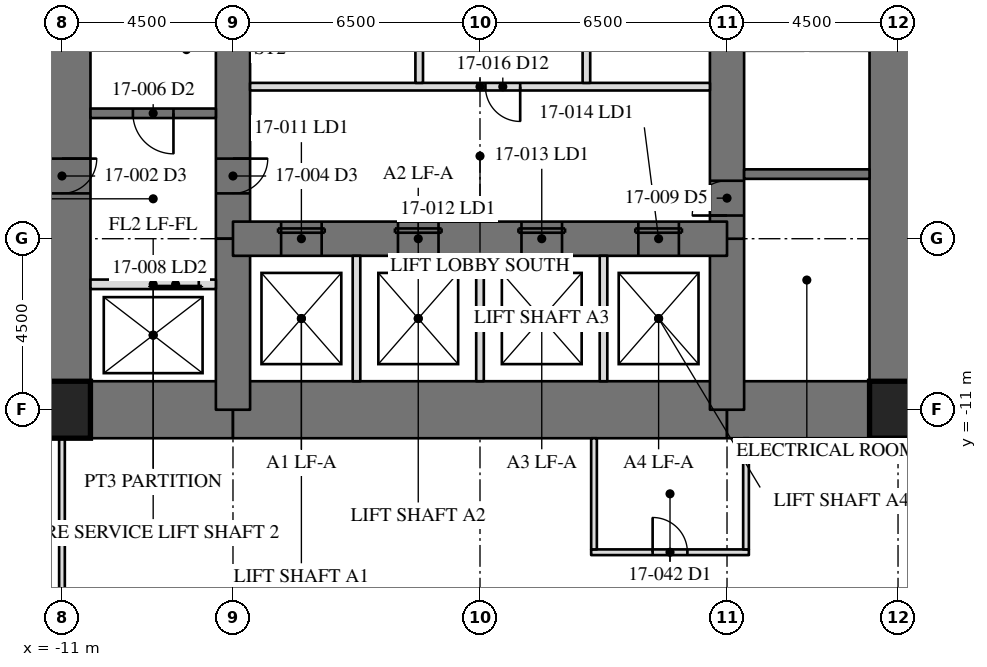
"""IFC4 building model, lengths in metres.
Left out: names, types, materials, properties, quantities, classifications, styles, units other than length and angle.
Written with IfcOpenShell. Run it as: python <this file> out.ifc"""

import sys

from ifc_helpers import new_model, si_unit, direction, frame, frame_2d, origin, origin_2d, place, context, subcontext, project, spatial, rectangle, hollow_rectangle, extrude, element, fill, save


model = new_model("IFC4")
c1 = context("Model", 3, precision=1e-05, world=origin(), true_north=direction((0.0, 1.0)))
c2 = subcontext(c1, "Body", "Model", "MODEL_VIEW")
j1 = project(units=[si_unit("LENGTHUNIT", "METRE"), si_unit("PLANEANGLEUNIT", "RADIAN")], contexts=[c1])
p1 = place(None, origin())
s1 = spatial("IfcSite", under=j1, at=p1, CompositionType="ELEMENT")
p2 = place(p1, origin())
s2 = spatial("IfcBuilding", under=s1, at=p2, CompositionType="ELEMENT")
p3 = place(p2, frame((0.0, 0.0, 73.4)))
s3 = spatial("IfcBuildingStorey", under=s2, at=p3, CompositionType="ELEMENT", Elevation=73.4)
p4 = place(p3, frame((11.0, -11.0, 0.0), z_axis=(0.0, 0.0, 1.0), x_axis=(0.0, 1.0, 0.0)))
e1 = element("IfcWall", 1, at=p4, inside=s3, PredefinedType="SHEAR", context=c2, shape_type="SweptSolid", body=[
    extrude(rectangle(XDim=22.0, YDim=1.5, at=frame_2d((11.0, 0.0))), origin(), (0.0, 0.0, 1.0), 4.1),
])
p5 = place(p4, frame((15.393, 0.0, 0.0)))
e2 = element("IfcOpeningElement", 2, at=p5, cuts=e1, PredefinedType="OPENING", context=c2, shape_type="SweptSolid", body=[
    extrude(rectangle(XDim=0.915, YDim=2.134, at=frame_2d((0.458, 1.067))), frame((0.0, 0.76, 0.0), z_axis=(0.0, -1.0, 0.0), x_axis=(1.0, 0.0, 0.0)), (0.0, 0.0, 1.0), 1.52),
])
p6 = place(p3, frame((-11.0, 11.0, 0.0), z_axis=(0.0, 0.0, 1.0), x_axis=(0.0, -1.0, 0.0)))
e3 = element("IfcWall", 3, at=p6, inside=s3, PredefinedType="SHEAR", context=c2, shape_type="SweptSolid", body=[
    extrude(rectangle(XDim=22.0, YDim=1.5, at=frame_2d((11.0, 0.0))), origin(), (0.0, 0.0, 1.0), 4.1),
])
p7 = place(p6, frame((15.393, 0.0, 0.0)))
e4 = element("IfcOpeningElement", 4, at=p7, cuts=e3, PredefinedType="OPENING", context=c2, shape_type="SweptSolid", body=[
    extrude(rectangle(XDim=0.915, YDim=2.134, at=frame_2d((0.458, 1.067))), frame((0.0, 0.76, 0.0), z_axis=(0.0, -1.0, 0.0), x_axis=(1.0, 0.0, 0.0)), (0.0, 0.0, 1.0), 1.52),
])
p8 = place(p3, frame((-11.0, -11.0, 0.0), z_axis=(0.0, 0.0, 1.0), x_axis=(1.0, 0.0, 0.0)))
e5 = element("IfcWall", 5, at=p8, inside=s3, PredefinedType="SHEAR", context=c2, shape_type="SweptSolid", body=[
    extrude(rectangle(XDim=4.5, YDim=1.5, at=frame_2d((2.25, 0.0))), origin(), (0.0, 0.0, 1.0), 4.1),
])
p9 = place(p3, frame((-6.5, -11.0, 0.0), z_axis=(0.0, 0.0, 1.0), x_axis=(1.0, 0.0, 0.0)))
e6 = element("IfcWall", 6, at=p9, inside=s3, PredefinedType="SHEAR", context=c2, shape_type="SweptSolid", body=[
    extrude(rectangle(XDim=13.0, YDim=1.5, at=frame_2d((6.5, 0.0))), origin(), (0.0, 0.0, 1.0), 4.1),
])
p10 = place(p3, frame((6.5, -11.0, 0.0), z_axis=(0.0, 0.0, 1.0), x_axis=(1.0, 0.0, 0.0)))
e7 = element("IfcWall", 7, at=p10, inside=s3, PredefinedType="SHEAR", context=c2, shape_type="SweptSolid", body=[
    extrude(rectangle(XDim=4.5, YDim=1.5, at=frame_2d((2.25, 0.0))), origin(), (0.0, 0.0, 1.0), 4.1),
])
p11 = place(p3, frame((6.5, -11.0, 0.0), z_axis=(0.0, 0.0, 1.0), x_axis=(0.0, 1.0, 0.0)))
e8 = element("IfcWall", 8, at=p11, inside=s3, PredefinedType="SHEAR", context=c2, shape_type="SweptSolid", body=[
    extrude(rectangle(XDim=4.5, YDim=0.9, at=frame_2d((2.25, 0.0))), origin(), (0.0, 0.0, 1.0), 4.1),
])
p12 = place(p3, frame((6.5, -6.5, 0.0), z_axis=(0.0, 0.0, 1.0), x_axis=(0.0, 1.0, 0.0)))
e9 = element("IfcWall", 9, at=p12, inside=s3, PredefinedType="SHEAR", context=c2, shape_type="SweptSolid", body=[
    extrude(rectangle(XDim=13.0, YDim=0.9, at=frame_2d((6.5, 0.0))), origin(), (0.0, 0.0, 1.0), 4.1),
])
p13 = place(p12, frame((10.893, 0.0, 0.0)))
e10 = element("IfcOpeningElement", 10, at=p13, cuts=e9, PredefinedType="OPENING", context=c2, shape_type="SweptSolid", body=[
    extrude(rectangle(XDim=0.915, YDim=2.134, at=frame_2d((0.458, 1.067))), frame((0.0, 0.46, 0.0), z_axis=(0.0, -1.0, 0.0), x_axis=(1.0, 0.0, 0.0)), (0.0, 0.0, 1.0), 0.92),
])
p14 = place(p12, frame((0.61, 0.0, 0.0)))
e11 = element("IfcOpeningElement", 11, at=p14, cuts=e9, PredefinedType="OPENING", context=c2, shape_type="SweptSolid", body=[
    extrude(rectangle(XDim=0.915, YDim=2.134, at=frame_2d((0.458, 1.067))), frame((0.0, 0.46, 0.0), z_axis=(0.0, -1.0, 0.0), x_axis=(1.0, 0.0, 0.0)), (0.0, 0.0, 1.0), 0.92),
])
p15 = place(p3, frame((-6.5, 6.5, 0.0), z_axis=(0.0, 0.0, 1.0), x_axis=(0.0, -1.0, 0.0)))
e12 = element("IfcWall", 12, at=p15, inside=s3, PredefinedType="SHEAR", context=c2, shape_type="SweptSolid", body=[
    extrude(rectangle(XDim=13.0, YDim=0.9, at=frame_2d((6.5, 0.0))), origin(), (0.0, 0.0, 1.0), 4.1),
])
p16 = place(p15, frame((10.893, 0.0, 0.0)))
e13 = element("IfcOpeningElement", 13, at=p16, cuts=e12, PredefinedType="OPENING", context=c2, shape_type="SweptSolid", body=[
    extrude(rectangle(XDim=0.915, YDim=2.134, at=frame_2d((0.458, 1.067))), frame((0.0, 0.46, 0.0), z_axis=(0.0, -1.0, 0.0), x_axis=(1.0, 0.0, 0.0)), (0.0, 0.0, 1.0), 0.92),
])
p17 = place(p15, frame((0.61, 0.0, 0.0)))
e14 = element("IfcOpeningElement", 14, at=p17, cuts=e12, PredefinedType="OPENING", context=c2, shape_type="SweptSolid", body=[
    extrude(rectangle(XDim=0.915, YDim=2.134, at=frame_2d((0.458, 1.067))), frame((0.0, 0.46, 0.0), z_axis=(0.0, -1.0, 0.0), x_axis=(1.0, 0.0, 0.0)), (0.0, 0.0, 1.0), 0.92),
])
p18 = place(p3, frame((-6.5, -6.5, 0.0), z_axis=(0.0, 0.0, 1.0), x_axis=(0.0, -1.0, 0.0)))
e15 = element("IfcWall", 15, at=p18, inside=s3, PredefinedType="SHEAR", context=c2, shape_type="SweptSolid", body=[
    extrude(rectangle(XDim=4.5, YDim=0.9, at=frame_2d((2.25, 0.0))), origin(), (0.0, 0.0, 1.0), 4.1),
])
p19 = place(p3, frame((-6.5, -6.5, 0.0), z_axis=(0.0, 0.0, 1.0), x_axis=(1.0, 0.0, 0.0)))
e16 = element("IfcWall", 16, at=p19, inside=s3, PredefinedType="SHEAR", context=c2, shape_type="SweptSolid", body=[
    extrude(rectangle(XDim=13.0, YDim=0.9, at=frame_2d((6.5, 0.0))), origin(), (0.0, 0.0, 1.0), 4.1),
])
p20 = place(p19, frame((1.267, 0.0, 0.0)))
e17 = element("IfcOpeningElement", 17, at=p20, cuts=e16, PredefinedType="OPENING", context=c2, shape_type="SweptSolid", body=[
    extrude(rectangle(XDim=1.067, YDim=2.134, at=frame_2d((0.533, 1.067))), frame((0.0, 0.46, 0.0), z_axis=(0.0, -1.0, 0.0), x_axis=(1.0, 0.0, 0.0)), (0.0, 0.0, 1.0), 0.92),
])
p21 = place(p19, frame((4.342, 0.0, 0.0)))
e18 = element("IfcOpeningElement", 18, at=p21, cuts=e16, PredefinedType="OPENING", context=c2, shape_type="SweptSolid", body=[
    extrude(rectangle(XDim=1.067, YDim=2.134, at=frame_2d((0.533, 1.067))), frame((0.0, 0.46, 0.0), z_axis=(0.0, -1.0, 0.0), x_axis=(1.0, 0.0, 0.0)), (0.0, 0.0, 1.0), 0.92),
])
p22 = place(p19, frame((7.592, 0.0, 0.0)))
e19 = element("IfcOpeningElement", 19, at=p22, cuts=e16, PredefinedType="OPENING", context=c2, shape_type="SweptSolid", body=[
    extrude(rectangle(XDim=1.067, YDim=2.134, at=frame_2d((0.533, 1.067))), frame((0.0, 0.46, 0.0), z_axis=(0.0, -1.0, 0.0), x_axis=(1.0, 0.0, 0.0)), (0.0, 0.0, 1.0), 0.92),
])
p23 = place(p19, frame((10.667, 0.0, 0.0)))
e20 = element("IfcOpeningElement", 20, at=p23, cuts=e16, PredefinedType="OPENING", context=c2, shape_type="SweptSolid", body=[
    extrude(rectangle(XDim=1.067, YDim=2.134, at=frame_2d((0.533, 1.067))), frame((0.0, 0.46, 0.0), z_axis=(0.0, -1.0, 0.0), x_axis=(1.0, 0.0, 0.0)), (0.0, 0.0, 1.0), 0.92),
])
for number, where, z_axis, x_axis in (
    (21, (-11.0, -11.0, 0.0), (0.0, 0.0, 1.0), (1.0, 0.0, 0.0)),
    (22, (11.0, -11.0, 0.0), (0.0, 0.0, 1.0), (1.0, 0.0, 0.0)),
):
    element("IfcColumn", number, at=place(p3, frame(where, z_axis=z_axis, x_axis=x_axis)), inside=s3, PredefinedType="COLUMN", context=c2, shape_type="SweptSolid", body=[
        extrude(hollow_rectangle(XDim=1.499, YDim=1.499, WallThickness=0.102, at=origin_2d()), origin(), (0.0, 0.0, 1.0), 4.1),
    ])
p24 = place(p3, frame((6.95, -4.8, 0.0), z_axis=(0.0, 0.0, 1.0), x_axis=(1.0, 0.0, 0.0)))
e23 = element("IfcWall", 23, at=p24, inside=s3, PredefinedType="SOLIDWALL", context=c2, shape_type="SweptSolid", body=[
    extrude(rectangle(XDim=3.3, YDim=0.25, at=frame_2d((1.65, 0.0))), origin(), (0.0, 0.0, 1.0), 3.91),
])
p25 = place(p3, frame((-6.95, -3.2, 0.0), z_axis=(0.0, 0.0, 1.0), x_axis=(-1.0, 0.0, 0.0)))
e24 = element("IfcWall", 24, at=p25, inside=s3, PredefinedType="SOLIDWALL", context=c2, shape_type="SweptSolid", body=[
    extrude(rectangle(XDim=3.3, YDim=0.25, at=frame_2d((1.65, 0.0))), origin(), (0.0, 0.0, 1.0), 3.91),
])
p26 = place(p25, frame((1.116, 0.0, 0.0)))
e25 = element("IfcOpeningElement", 25, at=p26, cuts=e24, PredefinedType="OPENING", context=c2, shape_type="SweptSolid", body=[
    extrude(rectangle(XDim=1.067, YDim=2.134, at=frame_2d((0.533, 1.067))), frame((0.0, 0.135, 0.0), z_axis=(0.0, -1.0, 0.0), x_axis=(1.0, 0.0, 0.0)), (0.0, 0.0, 1.0), 0.27),
])
p27 = place(p3, frame((-6.95, -7.7, 0.0), z_axis=(0.0, 0.0, 1.0), x_axis=(-1.0, 0.0, 0.0)))
e26 = element("IfcWall", 26, at=p27, inside=s3, PredefinedType="PARTITIONING", context=c2, shape_type="SweptSolid", body=[
    extrude(rectangle(XDim=3.3, YDim=0.25, at=frame_2d((1.65, 0.0))), origin(), (0.0, 0.0, 1.0), 3.91),
])
p28 = place(p27, frame((0.45, 0.0, 0.0)))
e27 = element("IfcOpeningElement", 27, at=p28, cuts=e26, PredefinedType="OPENING", context=c2, shape_type="SweptSolid", body=[
    extrude(rectangle(XDim=1.219, YDim=2.134, at=frame_2d((0.609, 1.067))), frame((0.0, 0.135, 0.0), z_axis=(0.0, -1.0, 0.0), x_axis=(1.0, 0.0, 0.0)), (0.0, 0.0, 1.0), 0.27),
])
p29 = place(p3, frame((6.05, -2.5, 0.0), z_axis=(0.0, 0.0, 1.0), x_axis=(-1.0, 0.0, 0.0)))
e28 = element("IfcWall", 28, at=p29, inside=s3, PredefinedType="PARTITIONING", context=c2, shape_type="SweptSolid", body=[
    extrude(rectangle(XDim=12.1, YDim=0.2, at=frame_2d((6.05, 0.0))), origin(), (0.0, 0.0, 1.0), 3.91),
])
p30 = place(p29, frame((4.992, 0.0, 0.0)))
e29 = element("IfcOpeningElement", 29, at=p30, cuts=e28, PredefinedType="OPENING", context=c2, shape_type="SweptSolid", body=[
    extrude(rectangle(XDim=0.915, YDim=2.134, at=frame_2d((0.458, 1.067))), frame((0.0, 0.11, 0.0), z_axis=(0.0, -1.0, 0.0), x_axis=(1.0, 0.0, 0.0)), (0.0, 0.0, 1.0), 0.22),
])
for number, where, z_axis, x_axis in (
    (30, (-3.25, -10.25, 0.0), (0.0, 0.0, 1.0), (0.0, 1.0, 0.0)),
    (31, (0.0, -10.25, 0.0), (0.0, 0.0, 1.0), (0.0, 1.0, 0.0)),
    (32, (3.25, -10.25, 0.0), (0.0, 0.0, 1.0), (0.0, 1.0, 0.0)),
):
    element("IfcWall", number, at=place(p3, frame(where, z_axis=z_axis, x_axis=x_axis)), inside=s3, PredefinedType="PARTITIONING", context=c2, shape_type="SweptSolid", body=[
        extrude(rectangle(XDim=3.3, YDim=0.2, at=frame_2d((1.65, 0.0))), origin(), (0.0, 0.0, 1.0), 3.91),
    ])
for number, where, z_axis, x_axis in (
    (33, (-1.6, -2.4, 0.0), (0.0, 0.0, 1.0), (0.0, 1.0, 0.0)),
    (34, (2.8, -2.4, 0.0), (0.0, 0.0, 1.0), (0.0, 1.0, 0.0)),
):
    element("IfcWall", number, at=place(p3, frame(where, z_axis=z_axis, x_axis=x_axis)), inside=s3, PredefinedType="PARTITIONING", context=c2, shape_type="SweptSolid", body=[
        extrude(rectangle(XDim=4.8, YDim=0.2, at=frame_2d((2.4, 0.0))), origin(), (0.0, 0.0, 1.0), 3.91),
    ])
p31 = place(p3, frame((-11.0, -11.75, 0.0), z_axis=(0.0, 0.0, 1.0), x_axis=(0.0, -1.0, 0.0)))
e35 = element("IfcWall", 35, at=p31, inside=s3, PredefinedType="PARTITIONING", context=c2, shape_type="SweptSolid", body=[
    extrude(rectangle(XDim=13.665, YDim=0.15, at=frame_2d((6.833, 0.0))), origin(), (0.0, 0.0, 1.0), 3.13),
])
p32 = place(p31, frame((6.018, 0.0, 0.0)))
e36 = element("IfcOpeningElement", 36, at=p32, cuts=e35, PredefinedType="OPENING", context=c2, shape_type="SweptSolid", body=[
    extrude(rectangle(XDim=0.915, YDim=2.134, at=frame_2d((0.458, 1.067))), frame((0.0, 0.085, 0.0), z_axis=(0.0, -1.0, 0.0), x_axis=(1.0, 0.0, 0.0)), (0.0, 0.0, 1.0), 0.17),
])
p33 = place(p3, frame((2.925, -14.75, 0.0), z_axis=(0.0, 0.0, 1.0), x_axis=(1.0, 0.0, 0.0)))
e37 = element("IfcWall", 37, at=p33, inside=s3, PredefinedType="PARTITIONING", context=c2, shape_type="SweptSolid", body=[
    extrude(rectangle(XDim=4.15, YDim=0.15, at=frame_2d((2.075, 0.0))), origin(), (0.0, 0.0, 1.0), 3.91),
])
p34 = place(p33, frame((1.617, 0.0, 0.0)))
e38 = element("IfcOpeningElement", 38, at=p34, cuts=e37, PredefinedType="OPENING", context=c2, shape_type="SweptSolid", body=[
    extrude(rectangle(XDim=0.915, YDim=2.134, at=frame_2d((0.458, 1.067))), frame((0.0, 0.085, 0.0), z_axis=(0.0, -1.0, 0.0), x_axis=(1.0, 0.0, 0.0)), (0.0, 0.0, 1.0), 0.17),
])
for number, where, z_axis, x_axis in (
    (39, (3.0, -14.675, 0.0), (0.0, 0.0, 1.0), (0.0, 1.0, 0.0)),
    (40, (7.0, -14.675, 0.0), (0.0, 0.0, 1.0), (0.0, 1.0, 0.0)),
):
    element("IfcWall", number, at=place(p3, frame(where, z_axis=z_axis, x_axis=x_axis)), inside=s3, PredefinedType="PARTITIONING", context=c2, shape_type="SweptSolid", body=[
        extrude(rectangle(XDim=2.925, YDim=0.15, at=frame_2d((1.462, 0.0))), origin(), (0.0, 0.0, 1.0), 3.91),
    ])
p35 = place(p16, origin())
e41 = element("IfcDoor", 41, at=p35, inside=s3, OperationType="SINGLE_SWING_RIGHT", PredefinedType="DOOR", context=c2, shape_type="SweptSolid", body=[
    extrude(rectangle(XDim=0.915, YDim=2.134, at=frame_2d((0.458, 1.067))), frame((0.0, -0.375, 0.0), z_axis=(0.0, -1.0, 0.0), x_axis=(1.0, 0.0, 0.0)), (0.0, 0.0, 1.0), 0.05),
])
fill(e13, e41)
p36 = place(p26, origin())
e42 = element("IfcDoor", 42, at=p36, inside=s3, OperationType="SINGLE_SWING_LEFT", PredefinedType="DOOR", context=c2, shape_type="SweptSolid", body=[
    extrude(rectangle(XDim=1.067, YDim=2.134, at=frame_2d((0.533, 1.067))), frame((0.0, 0.025, 0.0), z_axis=(0.0, -1.0, 0.0), x_axis=(1.0, 0.0, 0.0)), (0.0, 0.0, 1.0), 0.05),
])
fill(e25, e42)
p37 = place(p28, origin())
e43 = element("IfcDoor", 43, at=p37, inside=s3, OperationType="SLIDING_TO_LEFT", PredefinedType="DOOR", context=c2, shape_type="SweptSolid", body=[
    extrude(rectangle(XDim=1.219, YDim=2.134, at=frame_2d((0.609, 1.067))), frame((0.0, 0.025, 0.0), z_axis=(0.0, -1.0, 0.0), x_axis=(1.0, 0.0, 0.0)), (0.0, 0.0, 1.0), 0.05),
])
fill(e27, e43)
p38 = place(p14, origin())
e44 = element("IfcDoor", 44, at=p38, inside=s3, OperationType="SINGLE_SWING_RIGHT", PredefinedType="DOOR", context=c2, shape_type="SweptSolid", body=[
    extrude(rectangle(XDim=0.915, YDim=2.134, at=frame_2d((0.458, 1.067))), frame((0.0, -0.375, 0.0), z_axis=(0.0, -1.0, 0.0), x_axis=(1.0, 0.0, 0.0)), (0.0, 0.0, 1.0), 0.05),
])
fill(e11, e44)
p39 = place(p20, origin())
e45 = element("IfcDoor", 45, at=p39, inside=s3, OperationType="SLIDING_TO_LEFT", PredefinedType="DOOR", context=c2, shape_type="SweptSolid", body=[
    extrude(rectangle(XDim=1.067, YDim=2.134, at=frame_2d((0.533, 1.067))), frame((0.0, -0.375, 0.0), z_axis=(0.0, -1.0, 0.0), x_axis=(1.0, 0.0, 0.0)), (0.0, 0.0, 1.0), 0.05),
])
fill(e17, e45)
p40 = place(p21, origin())
e46 = element("IfcDoor", 46, at=p40, inside=s3, OperationType="SLIDING_TO_LEFT", PredefinedType="DOOR", context=c2, shape_type="SweptSolid", body=[
    extrude(rectangle(XDim=1.067, YDim=2.134, at=frame_2d((0.533, 1.067))), frame((0.0, -0.375, 0.0), z_axis=(0.0, -1.0, 0.0), x_axis=(1.0, 0.0, 0.0)), (0.0, 0.0, 1.0), 0.05),
])
fill(e18, e46)
p41 = place(p22, origin())
e47 = element("IfcDoor", 47, at=p41, inside=s3, OperationType="SLIDING_TO_LEFT", PredefinedType="DOOR", context=c2, shape_type="SweptSolid", body=[
    extrude(rectangle(XDim=1.067, YDim=2.134, at=frame_2d((0.533, 1.067))), frame((0.0, -0.375, 0.0), z_axis=(0.0, -1.0, 0.0), x_axis=(1.0, 0.0, 0.0)), (0.0, 0.0, 1.0), 0.05),
])
fill(e19, e47)
p42 = place(p23, origin())
e48 = element("IfcDoor", 48, at=p42, inside=s3, OperationType="SLIDING_TO_LEFT", PredefinedType="DOOR", context=c2, shape_type="SweptSolid", body=[
    extrude(rectangle(XDim=1.067, YDim=2.134, at=frame_2d((0.533, 1.067))), frame((0.0, -0.375, 0.0), z_axis=(0.0, -1.0, 0.0), x_axis=(1.0, 0.0, 0.0)), (0.0, 0.0, 1.0), 0.05),
])
fill(e20, e48)
p43 = place(p30, origin())
e49 = element("IfcDoor", 49, at=p43, inside=s3, OperationType="SINGLE_SWING_LEFT", PredefinedType="DOOR", context=c2, shape_type="SweptSolid", body=[
    extrude(rectangle(XDim=0.915, YDim=2.134, at=frame_2d((0.458, 1.067))), frame((0.0, 0.025, 0.0), z_axis=(0.0, -1.0, 0.0), x_axis=(1.0, 0.0, 0.0)), (0.0, 0.0, 1.0), 0.05),
])
fill(e29, e49)
p44 = place(p34, origin())
e50 = element("IfcDoor", 50, at=p44, inside=s3, OperationType="SINGLE_SWING_LEFT", PredefinedType="DOOR", context=c2, shape_type="SweptSolid", body=[
    extrude(rectangle(XDim=0.915, YDim=2.134, at=frame_2d((0.458, 1.067))), frame((0.0, 0.025, 0.0), z_axis=(0.0, -1.0, 0.0), x_axis=(1.0, 0.0, 0.0)), (0.0, 0.0, 1.0), 0.05),
])
fill(e38, e50)
save(model, sys.argv[1])
